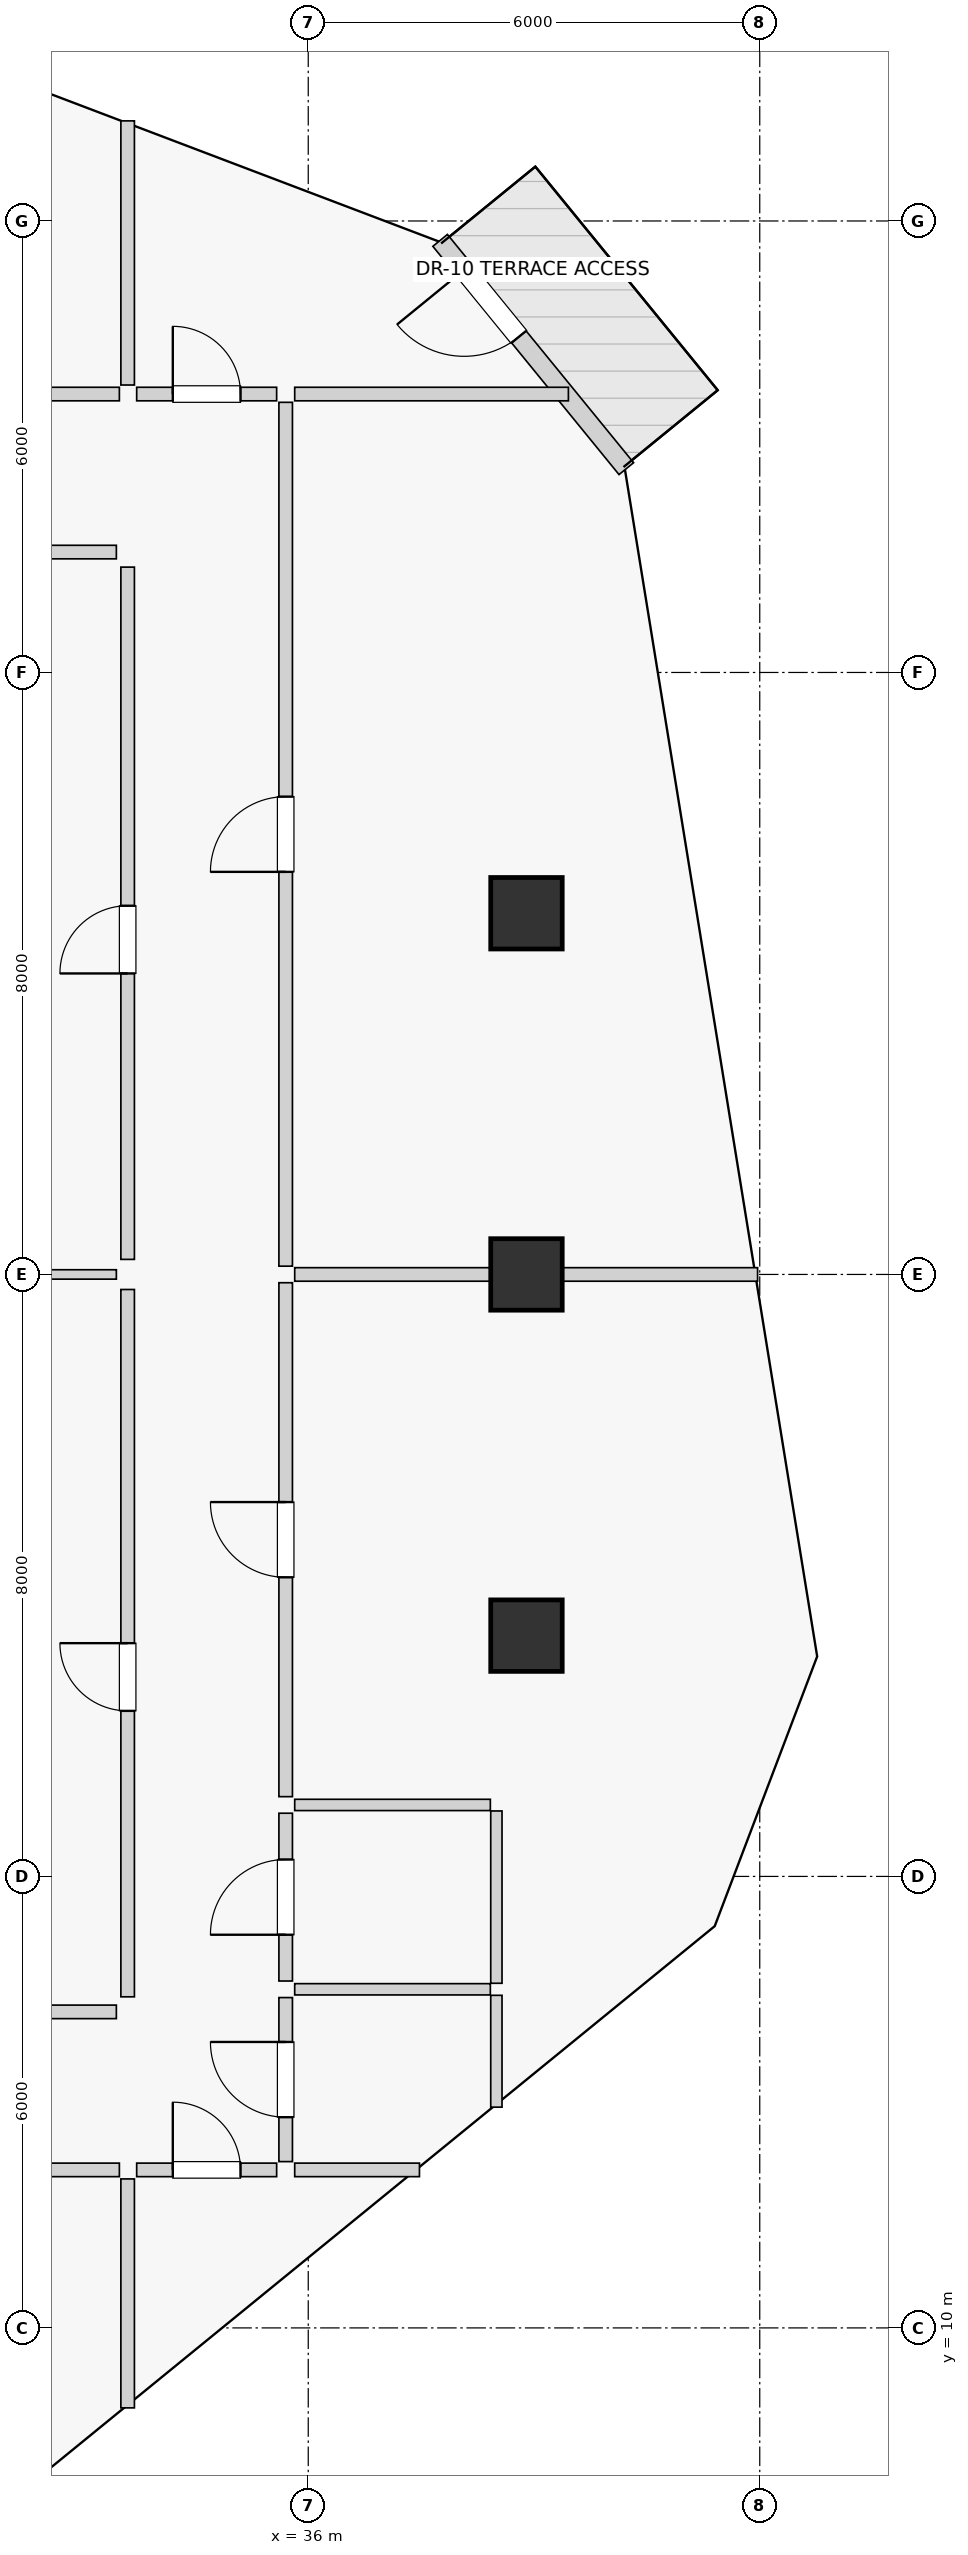
"""IFC4 building model, lengths in metres.
Left out: names, types, materials, properties, quantities, classifications, styles, units other than length and angle.
Written with IfcOpenShell. Run it as: python <this file> out.ifc"""

import sys

from ifc_helpers import new_model, si_unit, direction, frame, frame_2d, origin, origin_2d, place, context, subcontext, project, spatial, rectangle, extrude, source, transform, mapped, element, fill, save


model = new_model("IFC4")
c1 = context("Model", 3, precision=1e-05, world=origin(), true_north=direction((0.0, 1.0)))
c2 = subcontext(c1, "Body", "Model", "MODEL_VIEW")
j1 = project(units=[si_unit("LENGTHUNIT", "METRE"), si_unit("PLANEANGLEUNIT", "RADIAN")], contexts=[c1])
p1 = place(None, origin())
s1 = spatial("IfcSite", under=j1, at=p1, CompositionType="ELEMENT")
p2 = place(p1, origin())
s2 = spatial("IfcBuilding", under=s1, at=p2, CompositionType="ELEMENT")
p3 = place(p2, frame((0.0, 0.0, 174.35)))
s3 = spatial("IfcBuildingStorey", under=s2, at=p3, CompositionType="ELEMENT", Elevation=174.35)
for number, where, z_axis, x_axis in (
    (1, (38.9, 19.2, -0.32), (0.0, 0.0, 1.0), (1.0, 0.0, 0.0)),
    (2, (38.9, 24.0, -0.32), (0.0, 0.0, 1.0), (1.0, 0.0, 0.0)),
    (3, (38.9, 28.8, -0.32), (0.0, 0.0, 1.0), (1.0, 0.0, 0.0)),
):
    element("IfcColumn", number, at=place(p3, frame(where, z_axis=z_axis, x_axis=x_axis)), inside=s3, PredefinedType="COLUMN", context=c2, shape_type="SweptSolid", body=[
        extrude(rectangle(XDim=0.95, YDim=0.95, at=origin_2d()), origin(), (0.0, 0.0, 1.0), 4.82),
    ])
p4 = place(p3, frame((40.227, 34.709, 0.0), z_axis=(0.0, 0.0, 1.0), x_axis=(-0.632044931416, 0.774931741943, 0.0)))
e4 = element("IfcWall", 4, at=p4, inside=s3, PredefinedType="SOLIDWALL", context=c2, shape_type="SweptSolid", body=[
    extrude(rectangle(XDim=3.915, YDim=0.25, at=frame_2d((1.957, 0.0))), origin(), (0.0, 0.0, 1.0), 4.265),
])
p5 = place(p4, frame((2.26, 0.0, 0.0)))
e5 = element("IfcOpeningElement", 5, at=p5, cuts=e4, PredefinedType="OPENING", context=c2, shape_type="SweptSolid", body=[
    extrude(rectangle(XDim=1.15, YDim=2.25, at=frame_2d((0.575, 1.125))), frame((0.0, 0.135, 0.0), z_axis=(0.0, -1.0, 0.0), x_axis=(1.0, 0.0, 0.0)), (0.0, 0.0, 1.0), 0.27),
])
p6 = place(p3, frame((33.6, 14.4, 0.0), z_axis=(0.0, 0.0, 1.0), x_axis=(0.0, 1.0, 0.0)))
e6 = element("IfcWall", 6, at=p6, inside=s3, PredefinedType="PARTITIONING", context=c2, shape_type="SweptSolid", body=[
    extrude(rectangle(XDim=9.4, YDim=0.18, at=frame_2d((4.7, 0.0))), origin(), (0.0, 0.0, 1.0), 4.265),
])
p7 = place(p6, frame((3.8, 0.0, 0.0)))
e7 = element("IfcOpeningElement", 7, at=p7, cuts=e6, PredefinedType="OPENING", context=c2, shape_type="SweptSolid", body=[
    extrude(rectangle(XDim=0.9, YDim=2.01, at=frame_2d((0.45, 1.005))), frame((0.0, 0.1, 0.0), z_axis=(0.0, -1.0, 0.0), x_axis=(1.0, 0.0, 0.0)), (0.0, 0.0, 1.0), 0.2),
])
p8 = place(p3, frame((33.6, 24.2, 0.0), z_axis=(0.0, 0.0, 1.0), x_axis=(0.0, 1.0, 0.0)))
e8 = element("IfcWall", 8, at=p8, inside=s3, PredefinedType="PARTITIONING", context=c2, shape_type="SweptSolid", body=[
    extrude(rectangle(XDim=9.2, YDim=0.18, at=frame_2d((4.6, 0.0))), origin(), (0.0, 0.0, 1.0), 4.265),
])
p9 = place(p8, frame((3.8, 0.0, 0.0)))
e9 = element("IfcOpeningElement", 9, at=p9, cuts=e8, PredefinedType="OPENING", context=c2, shape_type="SweptSolid", body=[
    extrude(rectangle(XDim=0.9, YDim=2.01, at=frame_2d((0.45, 1.005))), frame((0.0, 0.1, 0.0), z_axis=(0.0, -1.0, 0.0), x_axis=(1.0, 0.0, 0.0)), (0.0, 0.0, 1.0), 0.2),
])
p10 = place(p3, frame((31.35, 24.0, 0.0), z_axis=(0.0, 0.0, 1.0), x_axis=(1.0, 0.0, 0.0)))
e10 = element("IfcWall", 10, at=p10, inside=s3, PredefinedType="PARTITIONING", context=c2, shape_type="SweptSolid", body=[
    extrude(rectangle(XDim=2.1, YDim=0.125, at=frame_2d((1.05, 0.0))), origin(), (0.0, 0.0, 1.0), 4.265),
])
for number, where, z_axis, x_axis in (
    (11, (30.9, 14.2, 0.0), (0.0, 0.0, 1.0), (1.0, 0.0, 0.0)),
    (12, (30.9, 33.6, 0.0), (0.0, 0.0, 1.0), (1.0, 0.0, 0.0)),
):
    element("IfcWall", number, at=place(p3, frame(where, z_axis=z_axis, x_axis=x_axis)), inside=s3, PredefinedType="PARTITIONING", context=c2, shape_type="SweptSolid", body=[
        extrude(rectangle(XDim=2.55, YDim=0.18, at=frame_2d((1.275, 0.0))), origin(), (0.0, 0.0, 1.0), 4.265),
    ])
p11 = place(p3, frame((33.6, 11.98, 0.0), z_axis=(0.0, 0.0, 1.0), x_axis=(0.0, -1.0, 0.0)))
e13 = element("IfcWall", 13, at=p11, inside=s3, PredefinedType="PARTITIONING", context=c2, shape_type="SweptSolid", body=[
    extrude(rectangle(XDim=3.043, YDim=0.18, at=frame_2d((1.521, 0.0))), origin(), (0.0, 0.0, 1.0), 4.265),
])
p12 = place(p3, frame((25.454, 12.1, 0.0), z_axis=(0.0, 0.0, 1.0), x_axis=(1.0, 0.0, 0.0)))
e14 = element("IfcWall", 14, at=p12, inside=s3, PredefinedType="PARTITIONING", context=c2, shape_type="SweptSolid", body=[
    extrude(rectangle(XDim=8.036, YDim=0.18, at=frame_2d((4.018, 0.0))), origin(), (0.0, 0.0, 1.0), 4.265),
])
p13 = place(p12, frame((3.518, 0.0, 0.0)))
e15 = element("IfcOpeningElement", 15, at=p13, cuts=e14, PredefinedType="OPENING", context=c2, shape_type="SweptSolid", body=[
    extrude(rectangle(XDim=1.0, YDim=2.01, at=frame_2d((0.5, 1.005))), frame((0.0, 0.1, 0.0), z_axis=(0.0, -1.0, 0.0), x_axis=(1.0, 0.0, 0.0)), (0.0, 0.0, 1.0), 0.2),
])
p14 = place(p3, frame((33.6, 35.82, 0.0), z_axis=(0.0, 0.0, 1.0), x_axis=(0.0, 1.0, 0.0)))
e16 = element("IfcWall", 16, at=p14, inside=s3, PredefinedType="PARTITIONING", context=c2, shape_type="SweptSolid", body=[
    extrude(rectangle(XDim=3.51, YDim=0.18, at=frame_2d((1.755, 0.0))), origin(), (0.0, 0.0, 1.0), 4.265),
])
p15 = place(p3, frame((25.454, 35.7, 0.0), z_axis=(0.0, 0.0, 1.0), x_axis=(1.0, 0.0, 0.0)))
e17 = element("IfcWall", 17, at=p15, inside=s3, PredefinedType="PARTITIONING", context=c2, shape_type="SweptSolid", body=[
    extrude(rectangle(XDim=8.036, YDim=0.18, at=frame_2d((4.018, 0.0))), origin(), (0.0, 0.0, 1.0), 4.265),
])
p16 = place(p15, frame((3.518, 0.0, 0.0)))
e18 = element("IfcOpeningElement", 18, at=p16, cuts=e17, PredefinedType="OPENING", context=c2, shape_type="SweptSolid", body=[
    extrude(rectangle(XDim=1.0, YDim=2.01, at=frame_2d((0.5, 1.005))), frame((0.0, 0.1, 0.0), z_axis=(0.0, -1.0, 0.0), x_axis=(1.0, 0.0, 0.0)), (0.0, 0.0, 1.0), 0.2),
])
p17 = place(p3, frame((35.82, 12.1, 0.0), z_axis=(0.0, 0.0, 1.0), x_axis=(1.0, 0.0, 0.0)))
e19 = element("IfcWall", 19, at=p17, inside=s3, PredefinedType="PARTITIONING", context=c2, shape_type="SweptSolid", body=[
    extrude(rectangle(XDim=1.658, YDim=0.18, at=frame_2d((0.829, 0.0))), origin(), (0.0, 0.0, 1.0), 4.265),
])
p18 = place(p3, frame((35.82, 35.7, 0.0), z_axis=(0.0, 0.0, 1.0), x_axis=(1.0, 0.0, 0.0)))
e20 = element("IfcWall", 20, at=p18, inside=s3, PredefinedType="PARTITIONING", context=c2, shape_type="SweptSolid", body=[
    extrude(rectangle(XDim=3.637, YDim=0.18, at=frame_2d((1.818, 0.0))), origin(), (0.0, 0.0, 1.0), 4.265),
])
p19 = place(p3, frame((35.7, 12.21, 0.0), z_axis=(0.0, 0.0, 1.0), x_axis=(0.0, 1.0, 0.0)))
e21 = element("IfcWall", 21, at=p19, inside=s3, PredefinedType="PARTITIONING", context=c2, shape_type="SweptSolid", body=[
    extrude(rectangle(XDim=2.18, YDim=0.18, at=frame_2d((1.09, 0.0))), origin(), (0.0, 0.0, 1.0), 4.265),
])
p20 = place(p19, frame((0.59, 0.0, 0.0)))
e22 = element("IfcOpeningElement", 22, at=p20, cuts=e21, PredefinedType="OPENING", context=c2, shape_type="SweptSolid", body=[
    extrude(rectangle(XDim=1.0, YDim=2.01, at=frame_2d((0.5, 1.005))), frame((0.0, 0.1, 0.0), z_axis=(0.0, -1.0, 0.0), x_axis=(1.0, 0.0, 0.0)), (0.0, 0.0, 1.0), 0.2),
])
p21 = place(p3, frame((35.7, 14.61, 0.0), z_axis=(0.0, 0.0, 1.0), x_axis=(0.0, 1.0, 0.0)))
e23 = element("IfcWall", 23, at=p21, inside=s3, PredefinedType="PARTITIONING", context=c2, shape_type="SweptSolid", body=[
    extrude(rectangle(XDim=2.23, YDim=0.18, at=frame_2d((1.115, 0.0))), origin(), (0.0, 0.0, 1.0), 4.265),
])
p22 = place(p21, frame((0.615, 0.0, 0.0)))
e24 = element("IfcOpeningElement", 24, at=p22, cuts=e23, PredefinedType="OPENING", context=c2, shape_type="SweptSolid", body=[
    extrude(rectangle(XDim=1.0, YDim=2.01, at=frame_2d((0.5, 1.005))), frame((0.0, 0.1, 0.0), z_axis=(0.0, -1.0, 0.0), x_axis=(1.0, 0.0, 0.0)), (0.0, 0.0, 1.0), 0.2),
])
p23 = place(p3, frame((35.7, 17.06, 0.0), z_axis=(0.0, 0.0, 1.0), x_axis=(0.0, 1.0, 0.0)))
e25 = element("IfcWall", 25, at=p23, inside=s3, PredefinedType="PARTITIONING", context=c2, shape_type="SweptSolid", body=[
    extrude(rectangle(XDim=6.83, YDim=0.18, at=frame_2d((3.415, 0.0))), origin(), (0.0, 0.0, 1.0), 4.265),
])
p24 = place(p23, frame((2.915, 0.0, 0.0)))
e26 = element("IfcOpeningElement", 26, at=p24, cuts=e25, PredefinedType="OPENING", context=c2, shape_type="SweptSolid", body=[
    extrude(rectangle(XDim=1.0, YDim=2.01, at=frame_2d((0.5, 1.005))), frame((0.0, 0.1, 0.0), z_axis=(0.0, -1.0, 0.0), x_axis=(1.0, 0.0, 0.0)), (0.0, 0.0, 1.0), 0.2),
])
p25 = place(p3, frame((35.7, 24.11, 0.0), z_axis=(0.0, 0.0, 1.0), x_axis=(0.0, 1.0, 0.0)))
e27 = element("IfcWall", 27, at=p25, inside=s3, PredefinedType="PARTITIONING", context=c2, shape_type="SweptSolid", body=[
    extrude(rectangle(XDim=11.48, YDim=0.18, at=frame_2d((5.74, 0.0))), origin(), (0.0, 0.0, 1.0), 4.265),
])
p26 = place(p25, frame((5.24, 0.0, 0.0)))
e28 = element("IfcOpeningElement", 28, at=p26, cuts=e27, PredefinedType="OPENING", context=c2, shape_type="SweptSolid", body=[
    extrude(rectangle(XDim=1.0, YDim=2.01, at=frame_2d((0.5, 1.005))), frame((0.0, 0.1, 0.0), z_axis=(0.0, -1.0, 0.0), x_axis=(1.0, 0.0, 0.0)), (0.0, 0.0, 1.0), 0.2),
])
for number, where, z_axis, x_axis in (
    (29, (35.82, 14.5, 0.0), (0.0, 0.0, 1.0), (1.0, 0.0, 0.0)),
    (30, (35.82, 16.95, 0.0), (0.0, 0.0, 1.0), (1.0, 0.0, 0.0)),
):
    element("IfcWall", number, at=place(p3, frame(where, z_axis=z_axis, x_axis=x_axis)), inside=s3, PredefinedType="PARTITIONING", context=c2, shape_type="SweptSolid", body=[
        extrude(rectangle(XDim=2.6, YDim=0.15, at=frame_2d((1.3, 0.0))), origin(), (0.0, 0.0, 1.0), 4.265),
    ])
p27 = place(p3, frame((38.5, 12.934, 0.0), z_axis=(0.0, 0.0, 1.0), x_axis=(0.0, 1.0, 0.0)))
e31 = element("IfcWall", 31, at=p27, inside=s3, PredefinedType="PARTITIONING", context=c2, shape_type="SweptSolid", body=[
    extrude(rectangle(XDim=1.486, YDim=0.15, at=frame_2d((0.743, 0.0))), origin(), (0.0, 0.0, 1.0), 4.265),
])
p28 = place(p3, frame((38.5, 14.58, 0.0), z_axis=(0.0, 0.0, 1.0), x_axis=(0.0, 1.0, 0.0)))
e32 = element("IfcWall", 32, at=p28, inside=s3, PredefinedType="PARTITIONING", context=c2, shape_type="SweptSolid", body=[
    extrude(rectangle(XDim=2.29, YDim=0.15, at=frame_2d((1.145, 0.0))), origin(), (0.0, 0.0, 1.0), 4.265),
])
p29 = place(p3, frame((35.82, 24.0, 0.0), z_axis=(0.0, 0.0, 1.0), x_axis=(1.0, 0.0, 0.0)))
e33 = element("IfcWall", 33, at=p29, inside=s3, PredefinedType="PARTITIONING", context=c2, shape_type="SweptSolid", body=[
    extrude(rectangle(XDim=6.151, YDim=0.18, at=frame_2d((3.076, 0.0))), origin(), (0.0, 0.0, 1.0), 4.265),
])
p30 = place(p3, frame((33.72, 12.1, 0.0), z_axis=(0.0, 0.0, 1.0), x_axis=(1.0, 0.0, 0.0)))
e34 = element("IfcWall", 34, at=p30, inside=s3, PredefinedType="PARTITIONING", context=c2, shape_type="SweptSolid", body=[
    extrude(rectangle(XDim=1.86, YDim=0.18, at=frame_2d((0.93, 0.0))), origin(), (0.0, 0.0, 1.0), 4.265),
])
p31 = place(p30, frame((0.48, 0.0, 0.0)))
e35 = element("IfcOpeningElement", 35, at=p31, cuts=e34, PredefinedType="OPENING", context=c2, shape_type="SweptSolid", body=[
    extrude(rectangle(XDim=0.9, YDim=2.01, at=frame_2d((0.45, 1.005))), frame((0.0, 0.1, 0.0), z_axis=(0.0, -1.0, 0.0), x_axis=(1.0, 0.0, 0.0)), (0.0, 0.0, 1.0), 0.2),
])
p32 = place(p3, frame((33.72, 35.7, 0.0), z_axis=(0.0, 0.0, 1.0), x_axis=(1.0, 0.0, 0.0)))
e36 = element("IfcWall", 36, at=p32, inside=s3, PredefinedType="PARTITIONING", context=c2, shape_type="SweptSolid", body=[
    extrude(rectangle(XDim=1.86, YDim=0.18, at=frame_2d((0.93, 0.0))), origin(), (0.0, 0.0, 1.0), 4.265),
])
p33 = place(p32, frame((0.48, 0.0, 0.0)))
e37 = element("IfcOpeningElement", 37, at=p33, cuts=e36, PredefinedType="OPENING", context=c2, shape_type="SweptSolid", body=[
    extrude(rectangle(XDim=0.9, YDim=2.01, at=frame_2d((0.45, 1.005))), frame((0.0, 0.1, 0.0), z_axis=(0.0, -1.0, 0.0), x_axis=(1.0, 0.0, 0.0)), (0.0, 0.0, 1.0), 0.2),
])
m1 = source(origin(), c2, "Body", "SweptSolid", [
    extrude(rectangle(XDim=1.15, YDim=2.25, at=frame_2d((0.575, 1.125))), frame((0.0, 0.025, 0.0), z_axis=(0.0, -1.0, 0.0), x_axis=(1.0, 0.0, 0.0)), (0.0, 0.0, 1.0), 0.05),
])
p34 = place(p5, frame((1.15, 0.0, 0.0), z_axis=(0.0, 0.0, 1.0), x_axis=(-1.0, 0.0, 0.0)))
e38 = element("IfcDoor", 38, at=p34, inside=s3, OperationType="SINGLE_SWING_RIGHT", PredefinedType="DOOR", context=c2, shape_type="MappedRepresentation", body=[
    mapped(m1, transform((0.0, 0.0, 0.0), scale=1.0)),
])
fill(e5, e38)
m2 = source(origin(), c2, "Body", "SweptSolid", [
    extrude(rectangle(XDim=0.9, YDim=2.01, at=frame_2d((0.45, 1.005))), frame((0.0, 0.025, 0.0), z_axis=(0.0, -1.0, 0.0), x_axis=(1.0, 0.0, 0.0)), (0.0, 0.0, 1.0), 0.05),
])
p35 = place(p7, origin())
e39 = element("IfcDoor", 39, at=p35, inside=s3, OperationType="SINGLE_SWING_RIGHT", PredefinedType="DOOR", context=c2, shape_type="MappedRepresentation", body=[
    mapped(m2, transform((0.0, 0.0, 0.0), scale=1.0)),
])
fill(e7, e39)
p36 = place(p9, origin())
e40 = element("IfcDoor", 40, at=p36, inside=s3, OperationType="SINGLE_SWING_LEFT", PredefinedType="DOOR", context=c2, shape_type="MappedRepresentation", body=[
    mapped(m2, transform((0.0, 0.0, 0.0), scale=1.0)),
])
fill(e9, e40)
m3 = source(origin(), c2, "Body", "SweptSolid", [
    extrude(rectangle(XDim=1.0, YDim=2.01, at=frame_2d((0.5, 1.005))), frame((0.0, 0.025, 0.0), z_axis=(0.0, -1.0, 0.0), x_axis=(1.0, 0.0, 0.0)), (0.0, 0.0, 1.0), 0.05),
])
p37 = place(p20, origin())
e41 = element("IfcDoor", 41, at=p37, inside=s3, OperationType="SINGLE_SWING_RIGHT", PredefinedType="DOOR", context=c2, shape_type="MappedRepresentation", body=[
    mapped(m3, transform((0.0, 0.0, 0.0), scale=1.0)),
])
fill(e22, e41)
p38 = place(p22, origin())
e42 = element("IfcDoor", 42, at=p38, inside=s3, OperationType="SINGLE_SWING_LEFT", PredefinedType="DOOR", context=c2, shape_type="MappedRepresentation", body=[
    mapped(m3, transform((0.0, 0.0, 0.0), scale=1.0)),
])
fill(e24, e42)
p39 = place(p24, origin())
e43 = element("IfcDoor", 43, at=p39, inside=s3, OperationType="SINGLE_SWING_RIGHT", PredefinedType="DOOR", context=c2, shape_type="MappedRepresentation", body=[
    mapped(m3, transform((0.0, 0.0, 0.0), scale=1.0)),
])
fill(e26, e43)
p40 = place(p26, origin())
e44 = element("IfcDoor", 44, at=p40, inside=s3, OperationType="SINGLE_SWING_LEFT", PredefinedType="DOOR", context=c2, shape_type="MappedRepresentation", body=[
    mapped(m3, transform((0.0, 0.0, 0.0), scale=1.0)),
])
fill(e28, e44)
p41 = place(p31, origin())
e45 = element("IfcDoor", 45, at=p41, inside=s3, OperationType="SINGLE_SWING_LEFT", PredefinedType="DOOR", context=c2, shape_type="MappedRepresentation", body=[
    mapped(m2, transform((0.0, 0.0, 0.0), scale=1.0)),
])
fill(e35, e45)
p42 = place(p33, origin())
e46 = element("IfcDoor", 46, at=p42, inside=s3, OperationType="SINGLE_SWING_LEFT", PredefinedType="DOOR", context=c2, shape_type="MappedRepresentation", body=[
    mapped(m2, transform((0.0, 0.0, 0.0), scale=1.0)),
])
fill(e37, e46)
save(model, sys.argv[1])
